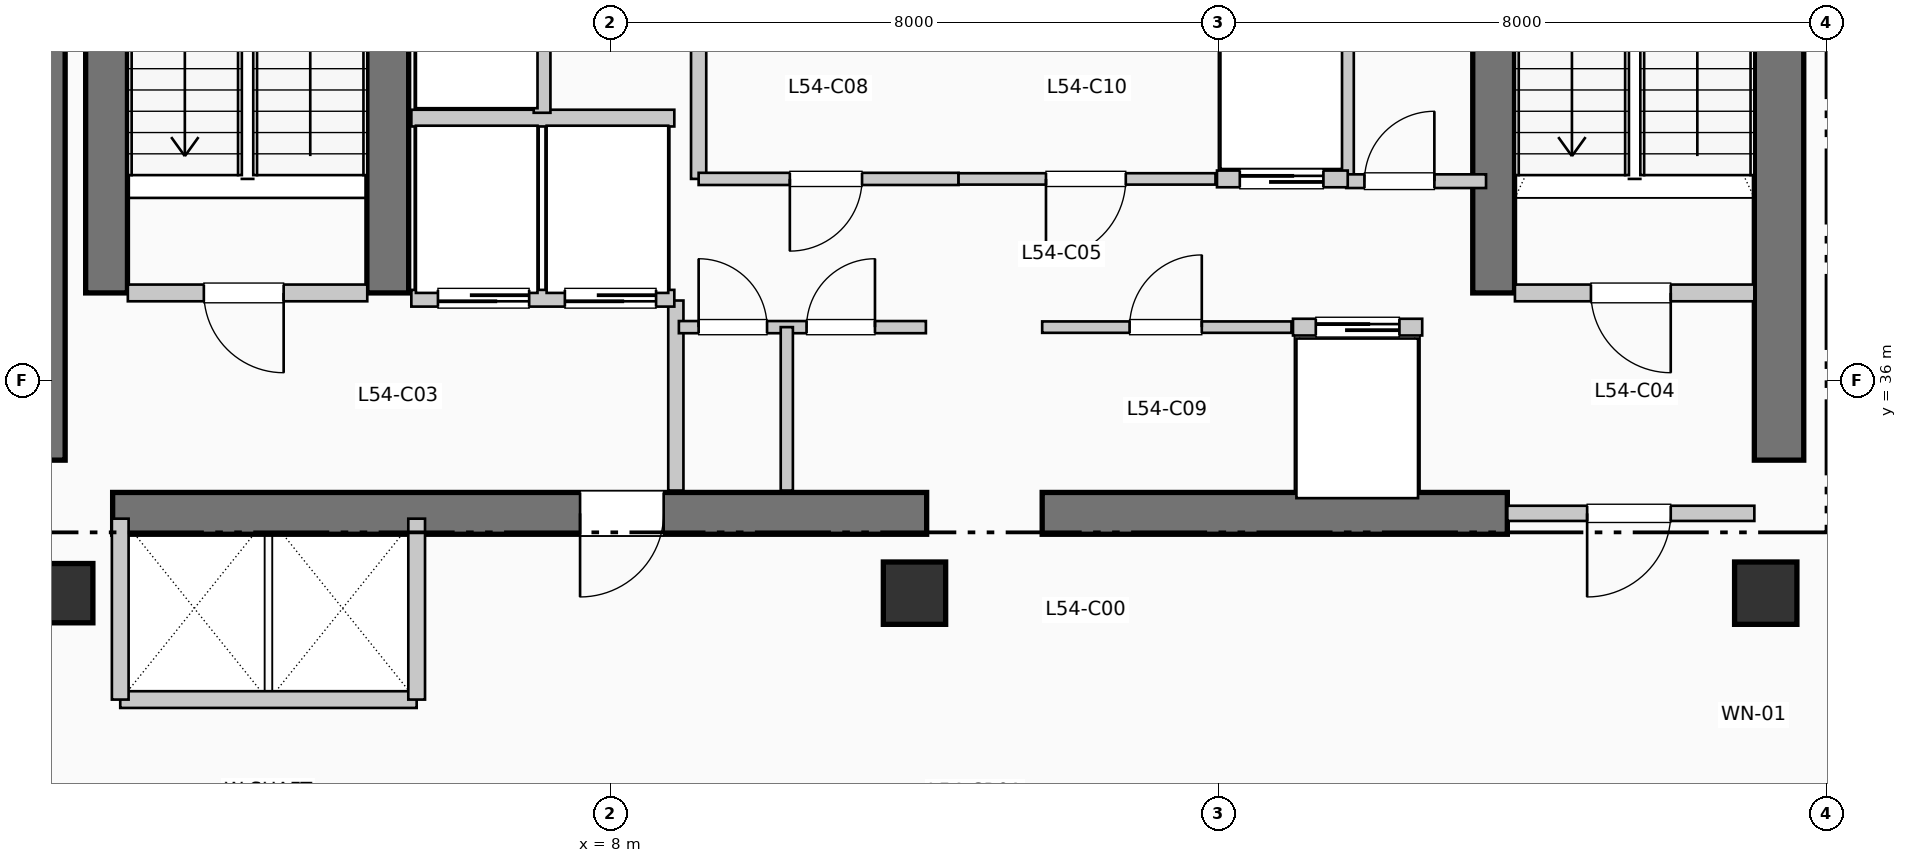
"""IFC4 building model, lengths in metres.
Left out: names, types, materials, properties, quantities, classifications, styles, units other than length and angle.
Written with IfcOpenShell. Run it as: python <this file> out.ifc"""

import sys

from ifc_helpers import new_model, si_unit, direction, frame, frame_2d, origin, origin_2d, place, context, subcontext, project, spatial, rectangle, extrude, element, fill, save


model = new_model("IFC4")
c1 = context("Model", 3, precision=1e-05, world=origin(), true_north=direction((0.0, 1.0)))
c2 = subcontext(c1, "Body", "Model", "MODEL_VIEW")
j1 = project(units=[si_unit("LENGTHUNIT", "METRE"), si_unit("PLANEANGLEUNIT", "RADIAN")], contexts=[c1])
p1 = place(None, origin())
s1 = spatial("IfcSite", under=j1, at=p1, CompositionType="ELEMENT")
p2 = place(p1, origin())
s2 = spatial("IfcBuilding", under=s1, at=p2, CompositionType="ELEMENT")
p3 = place(p2, frame((0.0, 0.0, 223.74)))
s3 = spatial("IfcBuildingStorey", under=s2, at=p3, CompositionType="ELEMENT", Elevation=223.74)
p4 = place(p3, frame((0.5, 34.95, 0.0), z_axis=(0.0, 0.0, 1.0), x_axis=(0.0, 1.0, 0.0)))
e1 = element("IfcWall", 1, at=p4, inside=s3, PredefinedType="SHEAR", context=c2, shape_type="SweptSolid", body=[
    extrude(rectangle(XDim=7.9, YDim=0.65, at=frame_2d((3.95, 0.0))), origin(), (0.0, 0.0, 1.0), 3.96),
])
p5 = place(p3, frame((23.375, 34.95, 0.0), z_axis=(0.0, 0.0, 1.0), x_axis=(0.0, 1.0, 0.0)))
e2 = element("IfcWall", 2, at=p5, inside=s3, PredefinedType="SHEAR", context=c2, shape_type="SweptSolid", body=[
    extrude(rectangle(XDim=10.64, YDim=0.65, at=frame_2d((5.32, 0.0))), origin(), (0.0, 0.0, 1.0), 3.96),
])
p6 = place(p3, frame((1.45, 34.25, 0.0), z_axis=(0.0, 0.0, 1.0), x_axis=(1.0, 0.0, 0.0)))
e3 = element("IfcWall", 3, at=p6, inside=s3, PredefinedType="SHEAR", context=c2, shape_type="SweptSolid", body=[
    extrude(rectangle(XDim=10.71, YDim=0.55, at=frame_2d((5.355, 0.0))), origin(), (0.0, 0.0, 1.0), 3.96),
])
p7 = place(p6, frame((7.25, 0.0, 0.0), z_axis=(0.0, 0.0, 1.0), x_axis=(-1.0, 0.0, 0.0)))
e4 = element("IfcOpeningElement", 4, at=p7, cuts=e3, PredefinedType="OPENING", context=c2, shape_type="SweptSolid", body=[
    extrude(rectangle(XDim=1.1, YDim=2.15, at=frame_2d((0.55, 1.075))), frame((0.0, 0.285, 0.0), z_axis=(0.0, -1.0, 0.0), x_axis=(1.0, 0.0, 0.0)), (0.0, 0.0, 1.0), 0.57),
])
p8 = place(p3, frame((13.68, 34.25, 0.0), z_axis=(0.0, 0.0, 1.0), x_axis=(1.0, 0.0, 0.0)))
e5 = element("IfcWall", 5, at=p8, inside=s3, PredefinedType="SHEAR", context=c2, shape_type="SweptSolid", body=[
    extrude(rectangle(XDim=6.12, YDim=0.55, at=frame_2d((3.06, 0.0))), origin(), (0.0, 0.0, 1.0), 3.96),
])
for number, where, z_axis, x_axis in (
    (6, (1.37, 37.15, 0.0), (0.0, 0.0, 1.0), (0.0, 1.0, 0.0)),
    (7, (5.07, 37.15, 0.0), (0.0, 0.0, 1.0), (0.0, 1.0, 0.0)),
    (8, (19.62, 37.15, 0.0), (0.0, 0.0, 1.0), (0.0, 1.0, 0.0)),
):
    element("IfcWall", number, at=place(p3, frame(where, z_axis=z_axis, x_axis=x_axis)), inside=s3, PredefinedType="SHEAR", context=c2, shape_type="SweptSolid", body=[
        extrude(rectangle(XDim=7.89, YDim=0.55, at=frame_2d((3.945, 0.0))), origin(), (0.0, 0.0, 1.0), 3.96),
    ])
p9 = place(p3, frame((0.8, 33.2, 0.0), z_axis=(0.0, 0.0, 1.0), x_axis=(1.0, 0.0, 0.0)))
e9 = element("IfcColumn", 9, at=p9, inside=s3, PredefinedType="COLUMN", context=c2, shape_type="SweptSolid", body=[
    extrude(rectangle(XDim=0.78, YDim=0.78, at=origin_2d()), origin(), (0.0, 0.0, 1.0), 3.96),
])
for number, where, z_axis, x_axis in (
    (10, (12.0, 33.2, 0.0), (0.0, 0.0, 1.0), (1.0, 0.0, 0.0)),
    (11, (23.2, 33.2, 0.0), (0.0, 0.0, 1.0), (1.0, 0.0, 0.0)),
):
    element("IfcColumn", number, at=place(p3, frame(where, z_axis=z_axis, x_axis=x_axis)), inside=s3, PredefinedType="COLUMN", context=c2, shape_type="SweptSolid", body=[
        extrude(rectangle(XDim=0.82, YDim=0.82, at=origin_2d()), origin(), (0.0, 0.0, 1.0), 3.96),
    ])
p10 = place(p3, frame((1.65, 37.15, 0.0), z_axis=(0.0, 0.0, 1.0), x_axis=(1.0, 0.0, 0.0)))
e12 = element("IfcWall", 12, at=p10, inside=s3, PredefinedType="PARTITIONING", context=c2, shape_type="SweptSolid", body=[
    extrude(rectangle(XDim=3.15, YDim=0.22, at=frame_2d((1.575, 0.0))), origin(), (0.0, 0.0, 1.0), 3.71),
])
p11 = place(p10, frame((2.05, 0.0, 0.0), z_axis=(0.0, 0.0, 1.0), x_axis=(-1.0, 0.0, 0.0)))
e13 = element("IfcOpeningElement", 13, at=p11, cuts=e12, PredefinedType="OPENING", context=c2, shape_type="SweptSolid", body=[
    extrude(rectangle(XDim=1.05, YDim=2.15, at=frame_2d((0.525, 1.075))), frame((0.0, 0.12, 0.0), z_axis=(0.0, -1.0, 0.0), x_axis=(1.0, 0.0, 0.0)), (0.0, 0.0, 1.0), 0.24),
])
p12 = place(p3, frame((8.86, 34.55, 0.0), z_axis=(0.0, 0.0, 1.0), x_axis=(0.0, 1.0, 0.0)))
e14 = element("IfcWall", 14, at=p12, inside=s3, PredefinedType="PARTITIONING", context=c2, shape_type="SweptSolid", body=[
    extrude(rectangle(XDim=2.5, YDim=0.2, at=frame_2d((1.25, 0.0))), origin(), (0.0, 0.0, 1.0), 3.71),
])
p13 = place(p3, frame((19.9, 37.15, 0.0), z_axis=(0.0, 0.0, 1.0), x_axis=(1.0, 0.0, 0.0)))
e15 = element("IfcWall", 15, at=p13, inside=s3, PredefinedType="PARTITIONING", context=c2, shape_type="SweptSolid", body=[
    extrude(rectangle(XDim=3.15, YDim=0.22, at=frame_2d((1.575, 0.0))), origin(), (0.0, 0.0, 1.0), 3.71),
])
p14 = place(p13, frame((2.05, 0.0, 0.0), z_axis=(0.0, 0.0, 1.0), x_axis=(-1.0, 0.0, 0.0)))
e16 = element("IfcOpeningElement", 16, at=p14, cuts=e15, PredefinedType="OPENING", context=c2, shape_type="SweptSolid", body=[
    extrude(rectangle(XDim=1.05, YDim=2.15, at=frame_2d((0.525, 1.075))), frame((0.0, 0.12, 0.0), z_axis=(0.0, -1.0, 0.0), x_axis=(1.0, 0.0, 0.0)), (0.0, 0.0, 1.0), 0.24),
])
p15 = place(p3, frame((19.8, 34.25, 0.0), z_axis=(0.0, 0.0, 1.0), x_axis=(1.0, 0.0, 0.0)))
e17 = element("IfcWall", 17, at=p15, inside=s3, PredefinedType="PARTITIONING", context=c2, shape_type="SweptSolid", body=[
    extrude(rectangle(XDim=3.25, YDim=0.2, at=frame_2d((1.625, 0.0))), origin(), (0.0, 0.0, 1.0), 3.71),
])
p16 = place(p15, frame((2.15, 0.0, 0.0), z_axis=(0.0, 0.0, 1.0), x_axis=(-1.0, 0.0, 0.0)))
e18 = element("IfcOpeningElement", 18, at=p16, cuts=e17, PredefinedType="OPENING", context=c2, shape_type="SweptSolid", body=[
    extrude(rectangle(XDim=1.1, YDim=2.15, at=frame_2d((0.55, 1.075))), frame((0.0, 0.11, 0.0), z_axis=(0.0, -1.0, 0.0), x_axis=(1.0, 0.0, 0.0)), (0.0, 0.0, 1.0), 0.22),
])
p17 = place(p3, frame((5.38, 37.08, 0.0), z_axis=(0.0, 0.0, 1.0), x_axis=(1.0, 0.0, 0.0)))
e19 = element("IfcWall", 19, at=p17, inside=s3, PredefinedType="PARTITIONING", context=c2, shape_type="SweptSolid", body=[
    extrude(rectangle(XDim=3.46, YDim=0.22, at=frame_2d((1.73, 0.0))), origin(), (0.0, 0.0, 1.0), 3.71),
])
p18 = place(p17, frame((1.55, 0.0, 0.0), z_axis=(0.0, 0.0, 1.0), x_axis=(-1.0, 0.0, 0.0)))
e20 = element("IfcOpeningElement", 20, at=p18, cuts=e19, PredefinedType="OPENING", context=c2, shape_type="SweptSolid", body=[
    extrude(rectangle(XDim=1.2, YDim=2.2, at=frame_2d((0.6, 1.1))), frame((0.0, 0.12, 0.0), z_axis=(0.0, -1.0, 0.0), x_axis=(1.0, 0.0, 0.0)), (0.0, 0.0, 1.0), 0.24),
])
p19 = place(p17, frame((3.22, 0.0, 0.0), z_axis=(0.0, 0.0, 1.0), x_axis=(-1.0, 0.0, 0.0)))
e21 = element("IfcOpeningElement", 21, at=p19, cuts=e19, PredefinedType="OPENING", context=c2, shape_type="SweptSolid", body=[
    extrude(rectangle(XDim=1.2, YDim=2.2, at=frame_2d((0.6, 1.1))), frame((0.0, 0.12, 0.0), z_axis=(0.0, -1.0, 0.0), x_axis=(1.0, 0.0, 0.0)), (0.0, 0.0, 1.0), 0.24),
])
p20 = place(p3, frame((5.38, 39.45, 0.0), z_axis=(0.0, 0.0, 1.0), x_axis=(1.0, 0.0, 0.0)))
e22 = element("IfcWall", 22, at=p20, inside=s3, PredefinedType="PARTITIONING", context=c2, shape_type="SweptSolid", body=[
    extrude(rectangle(XDim=3.46, YDim=0.22, at=frame_2d((1.73, 0.0))), origin(), (0.0, 0.0, 1.0), 3.71),
])
p21 = place(p3, frame((7.1, 39.52, 0.0), z_axis=(0.0, 0.0, 1.0), x_axis=(0.0, 1.0, 0.0)))
e23 = element("IfcWall", 23, at=p21, inside=s3, PredefinedType="PARTITIONING", context=c2, shape_type="SweptSolid", body=[
    extrude(rectangle(XDim=2.93, YDim=0.22, at=frame_2d((1.465, 0.0))), origin(), (0.0, 0.0, 1.0), 3.71),
])
p22 = place(p21, frame((0.85, 0.0, 0.0)))
e24 = element("IfcOpeningElement", 24, at=p22, cuts=e23, PredefinedType="OPENING", context=c2, shape_type="SweptSolid", body=[
    extrude(rectangle(XDim=1.1, YDim=2.2, at=frame_2d((0.55, 1.1))), frame((0.0, 0.12, 0.0), z_axis=(0.0, -1.0, 0.0), x_axis=(1.0, 0.0, 0.0)), (0.0, 0.0, 1.0), 0.24),
])
p23 = place(p3, frame((1.55, 31.8, 0.0), z_axis=(0.0, 0.0, 1.0), x_axis=(1.0, 0.0, 0.0)))
e25 = element("IfcWall", 25, at=p23, inside=s3, PredefinedType="PARTITIONING", context=c2, shape_type="SweptSolid", body=[
    extrude(rectangle(XDim=3.9, YDim=0.22, at=frame_2d((1.95, 0.0))), origin(), (0.0, 0.0, 1.0), 3.71),
])
for number, where, z_axis, x_axis in (
    (26, (1.55, 31.8, 0.0), (0.0, 0.0, 1.0), (0.0, 1.0, 0.0)),
    (27, (5.45, 31.8, 0.0), (0.0, 0.0, 1.0), (0.0, 1.0, 0.0)),
):
    element("IfcWall", number, at=place(p3, frame(where, z_axis=z_axis, x_axis=x_axis)), inside=s3, PredefinedType="PARTITIONING", context=c2, shape_type="SweptSolid", body=[
        extrude(rectangle(XDim=2.38, YDim=0.22, at=frame_2d((1.19, 0.0))), origin(), (0.0, 0.0, 1.0), 3.71),
    ])
for number, where, z_axis, x_axis in (
    (28, (9.16, 38.65, 0.0), (0.0, 0.0, 1.0), (0.0, 1.0, 0.0)),
    (29, (17.68, 38.65, 0.0), (0.0, 0.0, 1.0), (0.0, 1.0, 0.0)),
):
    element("IfcWall", number, at=place(p3, frame(where, z_axis=z_axis, x_axis=x_axis)), inside=s3, PredefinedType="PARTITIONING", context=c2, shape_type="SweptSolid", body=[
        extrude(rectangle(XDim=2.35, YDim=0.2, at=frame_2d((1.175, 0.0))), origin(), (0.0, 0.0, 1.0), 3.71),
    ])
p24 = place(p3, frame((17.68, 38.62, 0.0), z_axis=(0.0, 0.0, 1.0), x_axis=(1.0, 0.0, 0.0)))
e30 = element("IfcWall", 30, at=p24, inside=s3, PredefinedType="PARTITIONING", context=c2, shape_type="SweptSolid", body=[
    extrude(rectangle(XDim=1.84, YDim=0.18, at=frame_2d((0.92, 0.0))), origin(), (0.0, 0.0, 1.0), 3.71),
])
p25 = place(p24, frame((0.24, 0.0, 0.0)))
e31 = element("IfcOpeningElement", 31, at=p25, cuts=e30, PredefinedType="OPENING", context=c2, shape_type="SweptSolid", body=[
    extrude(rectangle(XDim=0.92, YDim=2.1, at=frame_2d((0.46, 1.05))), frame((0.0, 0.1, 0.0), z_axis=(0.0, -1.0, 0.0), x_axis=(1.0, 0.0, 0.0)), (0.0, 0.0, 1.0), 0.2),
])
p26 = place(p3, frame((8.9, 36.7, 0.0), z_axis=(0.0, 0.0, 1.0), x_axis=(1.0, 0.0, 0.0)))
e32 = element("IfcWall", 32, at=p26, inside=s3, PredefinedType="PARTITIONING", context=c2, shape_type="SweptSolid", body=[
    extrude(rectangle(XDim=3.25, YDim=0.16, at=frame_2d((1.625, 0.0))), origin(), (0.0, 0.0, 1.0), 3.71),
])
p27 = place(p26, frame((0.26, 0.0, 0.0)))
e33 = element("IfcOpeningElement", 33, at=p27, cuts=e32, PredefinedType="OPENING", context=c2, shape_type="SweptSolid", body=[
    extrude(rectangle(XDim=0.9, YDim=2.15, at=frame_2d((0.45, 1.075))), frame((0.0, 0.09, 0.0), z_axis=(0.0, -1.0, 0.0), x_axis=(1.0, 0.0, 0.0)), (0.0, 0.0, 1.0), 0.18),
])
p28 = place(p26, frame((1.68, 0.0, 0.0)))
e34 = element("IfcOpeningElement", 34, at=p28, cuts=e32, PredefinedType="OPENING", context=c2, shape_type="SweptSolid", body=[
    extrude(rectangle(XDim=0.9, YDim=2.15, at=frame_2d((0.45, 1.075))), frame((0.0, 0.09, 0.0), z_axis=(0.0, -1.0, 0.0), x_axis=(1.0, 0.0, 0.0)), (0.0, 0.0, 1.0), 0.18),
])
p29 = place(p3, frame((10.32, 34.55, 0.0), z_axis=(0.0, 0.0, 1.0), x_axis=(0.0, 1.0, 0.0)))
e35 = element("IfcWall", 35, at=p29, inside=s3, PredefinedType="PARTITIONING", context=c2, shape_type="SweptSolid", body=[
    extrude(rectangle(XDim=2.15, YDim=0.16, at=frame_2d((1.075, 0.0))), origin(), (0.0, 0.0, 1.0), 3.71),
])
p30 = place(p3, frame((9.16, 38.65, 0.0), z_axis=(0.0, 0.0, 1.0), x_axis=(1.0, 0.0, 0.0)))
e36 = element("IfcWall", 36, at=p30, inside=s3, PredefinedType="PARTITIONING", context=c2, shape_type="SweptSolid", body=[
    extrude(rectangle(XDim=3.42, YDim=0.16, at=frame_2d((1.71, 0.0))), origin(), (0.0, 0.0, 1.0), 3.71),
])
p31 = place(p30, frame((2.15, 0.0, 0.0), z_axis=(0.0, 0.0, 1.0), x_axis=(-1.0, 0.0, 0.0)))
e37 = element("IfcOpeningElement", 37, at=p31, cuts=e36, PredefinedType="OPENING", context=c2, shape_type="SweptSolid", body=[
    extrude(rectangle(XDim=0.95, YDim=2.15, at=frame_2d((0.475, 1.075))), frame((0.0, 0.09, 0.0), z_axis=(0.0, -1.0, 0.0), x_axis=(1.0, 0.0, 0.0)), (0.0, 0.0, 1.0), 0.18),
])
p32 = place(p3, frame((13.68, 36.7, 0.0), z_axis=(0.0, 0.0, 1.0), x_axis=(1.0, 0.0, 0.0)))
e38 = element("IfcWall", 38, at=p32, inside=s3, PredefinedType="PARTITIONING", context=c2, shape_type="SweptSolid", body=[
    extrude(rectangle(XDim=3.28, YDim=0.15, at=frame_2d((1.64, 0.0))), origin(), (0.0, 0.0, 1.0), 3.71),
])
p33 = place(p32, frame((1.15, 0.0, 0.0)))
e39 = element("IfcOpeningElement", 39, at=p33, cuts=e38, PredefinedType="OPENING", context=c2, shape_type="SweptSolid", body=[
    extrude(rectangle(XDim=0.95, YDim=2.15, at=frame_2d((0.475, 1.075))), frame((0.0, 0.085, 0.0), z_axis=(0.0, -1.0, 0.0), x_axis=(1.0, 0.0, 0.0)), (0.0, 0.0, 1.0), 0.17),
])
p34 = place(p3, frame((12.58, 38.65, 0.0), z_axis=(0.0, 0.0, 1.0), x_axis=(1.0, 0.0, 0.0)))
e40 = element("IfcWall", 40, at=p34, inside=s3, PredefinedType="PARTITIONING", context=c2, shape_type="SweptSolid", body=[
    extrude(rectangle(XDim=3.38, YDim=0.15, at=frame_2d((1.69, 0.0))), origin(), (0.0, 0.0, 1.0), 3.71),
])
p35 = place(p34, frame((2.2, 0.0, 0.0), z_axis=(0.0, 0.0, 1.0), x_axis=(-1.0, 0.0, 0.0)))
e41 = element("IfcOpeningElement", 41, at=p35, cuts=e40, PredefinedType="OPENING", context=c2, shape_type="SweptSolid", body=[
    extrude(rectangle(XDim=1.05, YDim=2.15, at=frame_2d((0.525, 1.075))), frame((0.0, 0.085, 0.0), z_axis=(0.0, -1.0, 0.0), x_axis=(1.0, 0.0, 0.0)), (0.0, 0.0, 1.0), 0.17),
])
p36 = place(p3, frame((16.98, 36.7, 0.0), z_axis=(0.0, 0.0, 1.0), x_axis=(1.0, 0.0, 0.0)))
e42 = element("IfcWall", 42, at=p36, inside=s3, PredefinedType="PARTITIONING", context=c2, shape_type="SweptSolid", body=[
    extrude(rectangle(XDim=1.7, YDim=0.22, at=frame_2d((0.85, 0.0))), origin(), (0.0, 0.0, 1.0), 3.71),
])
p37 = place(p36, frame((0.3, 0.0, 0.0)))
e43 = element("IfcOpeningElement", 43, at=p37, cuts=e42, PredefinedType="OPENING", context=c2, shape_type="SweptSolid", body=[
    extrude(rectangle(XDim=1.1, YDim=2.2, at=frame_2d((0.55, 1.1))), frame((0.0, 0.12, 0.0), z_axis=(0.0, -1.0, 0.0), x_axis=(1.0, 0.0, 0.0)), (0.0, 0.0, 1.0), 0.24),
])
p38 = place(p3, frame((15.98, 38.65, 0.0), z_axis=(0.0, 0.0, 1.0), x_axis=(1.0, 0.0, 0.0)))
e44 = element("IfcWall", 44, at=p38, inside=s3, PredefinedType="PARTITIONING", context=c2, shape_type="SweptSolid", body=[
    extrude(rectangle(XDim=1.72, YDim=0.22, at=frame_2d((0.86, 0.0))), origin(), (0.0, 0.0, 1.0), 3.71),
])
p39 = place(p38, frame((0.3, 0.0, 0.0)))
e45 = element("IfcOpeningElement", 45, at=p39, cuts=e44, PredefinedType="OPENING", context=c2, shape_type="SweptSolid", body=[
    extrude(rectangle(XDim=1.1, YDim=2.2, at=frame_2d((0.55, 1.1))), frame((0.0, 0.12, 0.0), z_axis=(0.0, -1.0, 0.0), x_axis=(1.0, 0.0, 0.0)), (0.0, 0.0, 1.0), 0.24),
])
p40 = place(p11, origin())
e46 = element("IfcDoor", 46, at=p40, inside=s3, OperationType="SINGLE_SWING_RIGHT", PredefinedType="DOOR", context=c2, shape_type="SweptSolid", body=[
    extrude(rectangle(XDim=1.05, YDim=2.15, at=frame_2d((0.525, 1.075))), frame((0.0, 0.025, 0.0), z_axis=(0.0, -1.0, 0.0), x_axis=(1.0, 0.0, 0.0)), (0.0, 0.0, 1.0), 0.05),
])
fill(e13, e46)
p41 = place(p7, origin())
e47 = element("IfcDoor", 47, at=p41, inside=s3, OperationType="SINGLE_SWING_LEFT", PredefinedType="DOOR", context=c2, shape_type="SweptSolid", body=[
    extrude(rectangle(XDim=1.1, YDim=2.15, at=frame_2d((0.55, 1.075))), frame((0.0, 0.025, 0.0), z_axis=(0.0, -1.0, 0.0), x_axis=(1.0, 0.0, 0.0)), (0.0, 0.0, 1.0), 0.05),
])
fill(e4, e47)
p42 = place(p14, origin())
e48 = element("IfcDoor", 48, at=p42, inside=s3, OperationType="SINGLE_SWING_RIGHT", PredefinedType="DOOR", context=c2, shape_type="SweptSolid", body=[
    extrude(rectangle(XDim=1.05, YDim=2.15, at=frame_2d((0.525, 1.075))), frame((0.0, 0.025, 0.0), z_axis=(0.0, -1.0, 0.0), x_axis=(1.0, 0.0, 0.0)), (0.0, 0.0, 1.0), 0.05),
])
fill(e16, e48)
p43 = place(p16, origin())
e49 = element("IfcDoor", 49, at=p43, inside=s3, OperationType="SINGLE_SWING_LEFT", PredefinedType="DOOR", context=c2, shape_type="SweptSolid", body=[
    extrude(rectangle(XDim=1.1, YDim=2.15, at=frame_2d((0.55, 1.075))), frame((0.0, 0.025, 0.0), z_axis=(0.0, -1.0, 0.0), x_axis=(1.0, 0.0, 0.0)), (0.0, 0.0, 1.0), 0.05),
])
fill(e18, e49)
p44 = place(p18, origin())
e50 = element("IfcDoor", 50, at=p44, inside=s3, OperationType="SLIDING_TO_RIGHT", PredefinedType="DOOR", context=c2, shape_type="SweptSolid", body=[
    extrude(rectangle(XDim=1.2, YDim=2.2, at=frame_2d((0.6, 1.1))), frame((0.0, 0.025, 0.0), z_axis=(0.0, -1.0, 0.0), x_axis=(1.0, 0.0, 0.0)), (0.0, 0.0, 1.0), 0.05),
])
fill(e20, e50)
p45 = place(p19, origin())
e51 = element("IfcDoor", 51, at=p45, inside=s3, OperationType="SLIDING_TO_RIGHT", PredefinedType="DOOR", context=c2, shape_type="SweptSolid", body=[
    extrude(rectangle(XDim=1.2, YDim=2.2, at=frame_2d((0.6, 1.1))), frame((0.0, 0.025, 0.0), z_axis=(0.0, -1.0, 0.0), x_axis=(1.0, 0.0, 0.0)), (0.0, 0.0, 1.0), 0.05),
])
fill(e21, e51)
p46 = place(p25, origin())
e52 = element("IfcDoor", 52, at=p46, inside=s3, OperationType="SINGLE_SWING_RIGHT", PredefinedType="DOOR", context=c2, shape_type="SweptSolid", body=[
    extrude(rectangle(XDim=0.92, YDim=2.1, at=frame_2d((0.46, 1.05))), frame((0.0, 0.025, 0.0), z_axis=(0.0, -1.0, 0.0), x_axis=(1.0, 0.0, 0.0)), (0.0, 0.0, 1.0), 0.05),
])
fill(e31, e52)
p47 = place(p27, origin())
e53 = element("IfcDoor", 53, at=p47, inside=s3, OperationType="SINGLE_SWING_LEFT", PredefinedType="DOOR", context=c2, shape_type="SweptSolid", body=[
    extrude(rectangle(XDim=0.9, YDim=2.15, at=frame_2d((0.45, 1.075))), frame((0.0, 0.025, 0.0), z_axis=(0.0, -1.0, 0.0), x_axis=(1.0, 0.0, 0.0)), (0.0, 0.0, 1.0), 0.05),
])
fill(e33, e53)
p48 = place(p28, origin())
e54 = element("IfcDoor", 54, at=p48, inside=s3, OperationType="SINGLE_SWING_RIGHT", PredefinedType="DOOR", context=c2, shape_type="SweptSolid", body=[
    extrude(rectangle(XDim=0.9, YDim=2.15, at=frame_2d((0.45, 1.075))), frame((0.0, 0.025, 0.0), z_axis=(0.0, -1.0, 0.0), x_axis=(1.0, 0.0, 0.0)), (0.0, 0.0, 1.0), 0.05),
])
fill(e34, e54)
p49 = place(p31, origin())
e55 = element("IfcDoor", 55, at=p49, inside=s3, OperationType="SINGLE_SWING_LEFT", PredefinedType="DOOR", context=c2, shape_type="SweptSolid", body=[
    extrude(rectangle(XDim=0.95, YDim=2.15, at=frame_2d((0.475, 1.075))), frame((0.0, 0.025, 0.0), z_axis=(0.0, -1.0, 0.0), x_axis=(1.0, 0.0, 0.0)), (0.0, 0.0, 1.0), 0.05),
])
fill(e37, e55)
p50 = place(p33, origin())
e56 = element("IfcDoor", 56, at=p50, inside=s3, OperationType="SINGLE_SWING_RIGHT", PredefinedType="DOOR", context=c2, shape_type="SweptSolid", body=[
    extrude(rectangle(XDim=0.95, YDim=2.15, at=frame_2d((0.475, 1.075))), frame((0.0, 0.025, 0.0), z_axis=(0.0, -1.0, 0.0), x_axis=(1.0, 0.0, 0.0)), (0.0, 0.0, 1.0), 0.05),
])
fill(e39, e56)
p51 = place(p35, origin())
e57 = element("IfcDoor", 57, at=p51, inside=s3, OperationType="SINGLE_SWING_LEFT", PredefinedType="DOOR", context=c2, shape_type="SweptSolid", body=[
    extrude(rectangle(XDim=1.05, YDim=2.15, at=frame_2d((0.525, 1.075))), frame((0.0, 0.025, 0.0), z_axis=(0.0, -1.0, 0.0), x_axis=(1.0, 0.0, 0.0)), (0.0, 0.0, 1.0), 0.05),
])
fill(e41, e57)
p52 = place(p37, origin())
e58 = element("IfcDoor", 58, at=p52, inside=s3, OperationType="SLIDING_TO_LEFT", PredefinedType="DOOR", context=c2, shape_type="SweptSolid", body=[
    extrude(rectangle(XDim=1.1, YDim=2.2, at=frame_2d((0.55, 1.1))), frame((0.0, 0.025, 0.0), z_axis=(0.0, -1.0, 0.0), x_axis=(1.0, 0.0, 0.0)), (0.0, 0.0, 1.0), 0.05),
])
fill(e43, e58)
p53 = place(p39, origin())
e59 = element("IfcDoor", 59, at=p53, inside=s3, OperationType="SLIDING_TO_LEFT", PredefinedType="DOOR", context=c2, shape_type="SweptSolid", body=[
    extrude(rectangle(XDim=1.1, YDim=2.2, at=frame_2d((0.55, 1.1))), frame((0.0, 0.025, 0.0), z_axis=(0.0, -1.0, 0.0), x_axis=(1.0, 0.0, 0.0)), (0.0, 0.0, 1.0), 0.05),
])
fill(e45, e59)
save(model, sys.argv[1])
